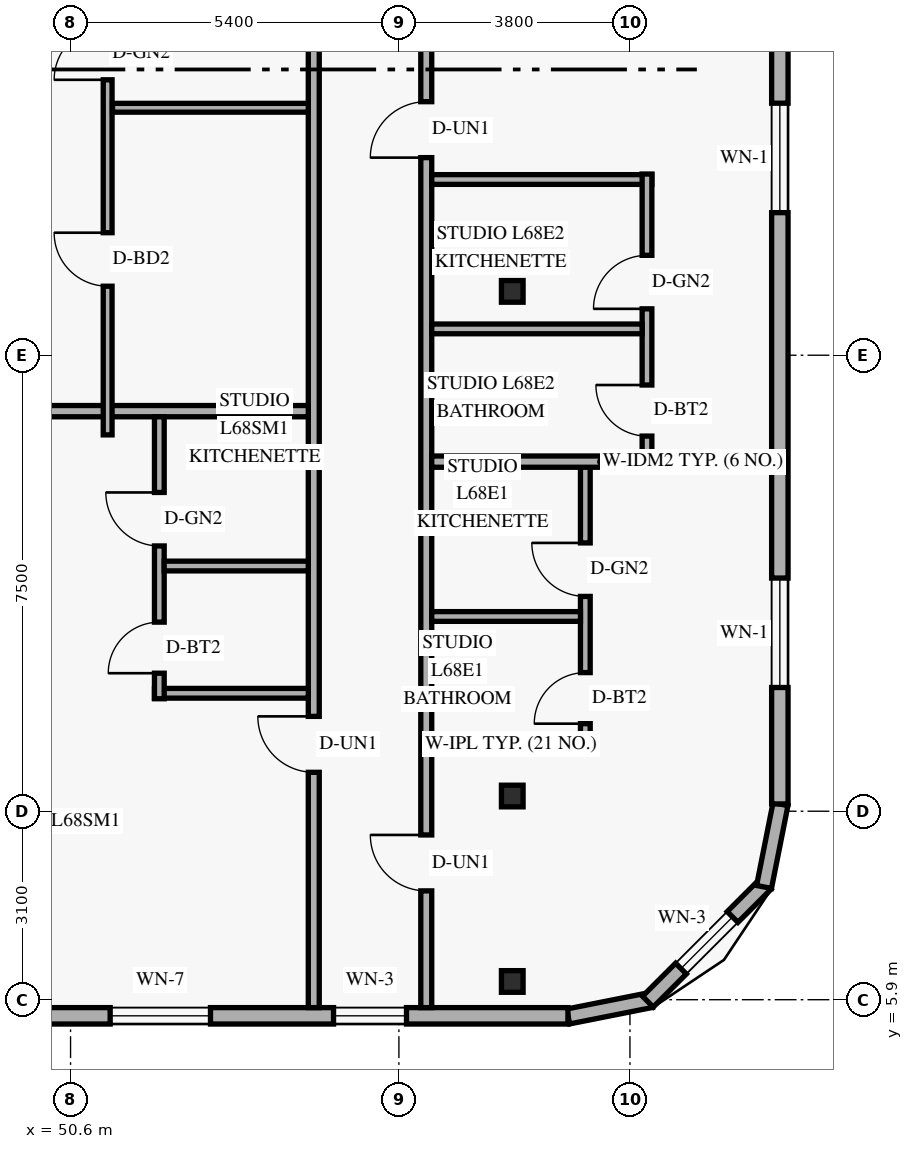
"""IFC4 building model, lengths in metres.
Left out: names, types, materials, properties, quantities, classifications, styles, units other than length and angle.
Written with IfcOpenShell. Run it as: python <this file> out.ifc"""

import sys

from ifc_helpers import new_model, si_unit, direction, frame, frame_2d, origin, origin_2d, place, context, subcontext, project, spatial, rectangle, hollow_rectangle, extrude, element, fill, save


model = new_model("IFC4")
c1 = context("Model", 3, precision=1e-05, world=origin(), true_north=direction((0.0, 1.0)))
c2 = subcontext(c1, "Body", "Model", "MODEL_VIEW")
j1 = project(units=[si_unit("LENGTHUNIT", "METRE"), si_unit("PLANEANGLEUNIT", "RADIAN")], contexts=[c1])
p1 = place(None, origin())
s1 = spatial("IfcSite", under=j1, at=p1, CompositionType="ELEMENT")
p2 = place(p1, origin())
s2 = spatial("IfcBuilding", under=s1, at=p2, CompositionType="ELEMENT")
p3 = place(p2, frame((0.0, 0.0, 260.4)))
s3 = spatial("IfcBuildingStorey", under=s2, at=p3, CompositionType="ELEMENT", Elevation=260.4)
for number, where, z_axis, x_axis in (
    (1, (57.76, 6.2, 0.0), (0.058, 0.0, 0.998), (0.0, 1.0, 0.0)),
    (2, (57.76, 9.25, 0.0), (0.058, 0.0, 0.998), (0.0, 1.0, 0.0)),
    (3, (57.76, 17.55, 0.0), (0.058, 0.0, 0.998), (0.0, 1.0, 0.0)),
):
    element("IfcColumn", number, at=place(p3, frame(where, z_axis=z_axis, x_axis=x_axis)), inside=s3, PredefinedType="COLUMN", context=c2, shape_type="SweptSolid", body=[
        extrude(hollow_rectangle(XDim=0.356, YDim=0.356, WallThickness=0.016, at=origin_2d()), origin(), (0.0, 0.0, 1.0), 3.606),
    ])
p4 = place(p3, frame((58.783, 5.624, 0.0), z_axis=(0.0, 0.0, 1.0), x_axis=(0.980809899341, 0.19496651342, 0.0)))
e4 = element("IfcWall", 4, at=p4, inside=s3, PredefinedType="SOLIDWALL", context=c2, shape_type="SweptSolid", body=[
    extrude(rectangle(XDim=1.389, YDim=0.25, at=frame_2d((0.694, 0.0))), origin(), (0.0, 0.0, 1.0), 3.36),
])
p5 = place(p3, frame((60.095, 5.868, 0.0), z_axis=(0.0, 0.0, 1.0), x_axis=(0.707106781187, 0.707106781187, 0.0)))
e5 = element("IfcWall", 5, at=p5, inside=s3, PredefinedType="SOLIDWALL", context=c2, shape_type="SweptSolid", body=[
    extrude(rectangle(XDim=2.739, YDim=0.25, at=frame_2d((1.37, 0.0))), origin(), (0.0, 0.0, 1.0), 3.36),
])
p6 = place(p5, frame((0.77, 0.0, 0.85)))
e6 = element("IfcOpeningElement", 6, at=p6, cuts=e5, PredefinedType="OPENING", context=c2, shape_type="SweptSolid", body=[
    extrude(rectangle(XDim=1.2, YDim=1.5, at=frame_2d((0.6, 0.75))), frame((0.0, 0.135, 0.0), z_axis=(0.0, -1.0, 0.0), x_axis=(1.0, 0.0, 0.0)), (0.0, 0.0, 1.0), 0.27),
])
p7 = place(p3, frame((62.005, 7.754, 0.0), z_axis=(0.0, 0.0, 1.0), x_axis=(0.195135625965, 0.9807762678, 0.0)))
e7 = element("IfcWall", 7, at=p7, inside=s3, PredefinedType="SOLIDWALL", context=c2, shape_type="SweptSolid", body=[
    extrude(rectangle(XDim=1.389, YDim=0.25, at=frame_2d((0.694, 0.0))), origin(), (0.0, 0.0, 1.0), 3.36),
])
p8 = place(p3, frame((25.82, 5.635, 0.0), z_axis=(0.0, 0.0, 1.0), x_axis=(1.0, 0.0, 0.0)))
e8 = element("IfcWall", 8, at=p8, inside=s3, PredefinedType="SOLIDWALL", context=c2, shape_type="SweptSolid", body=[
    extrude(rectangle(XDim=32.96, YDim=0.27, at=frame_2d((16.48, 0.0))), origin(), (0.0, 0.0, 1.0), 3.36),
])
p9 = place(p8, frame((14.212, 0.0, 0.85)))
e9 = element("IfcOpeningElement", 9, at=p9, cuts=e8, PredefinedType="OPENING", context=c2, shape_type="SweptSolid", body=[
    extrude(rectangle(XDim=1.65, YDim=1.6, at=frame_2d((0.825, 0.8))), frame((0.0, 0.145, 0.0), z_axis=(0.0, -1.0, 0.0), x_axis=(1.0, 0.0, 0.0)), (0.0, 0.0, 1.0), 0.29),
])
p10 = place(p8, frame((25.431, 0.0, 0.85)))
e10 = element("IfcOpeningElement", 10, at=p10, cuts=e8, PredefinedType="OPENING", context=c2, shape_type="SweptSolid", body=[
    extrude(rectangle(XDim=1.65, YDim=1.6, at=frame_2d((0.825, 0.8))), frame((0.0, 0.145, 0.0), z_axis=(0.0, -1.0, 0.0), x_axis=(1.0, 0.0, 0.0)), (0.0, 0.0, 1.0), 0.29),
])
p11 = place(p8, frame((29.105, 0.0, 0.85)))
e11 = element("IfcOpeningElement", 11, at=p11, cuts=e8, PredefinedType="OPENING", context=c2, shape_type="SweptSolid", body=[
    extrude(rectangle(XDim=1.2, YDim=1.5, at=frame_2d((0.6, 0.75))), frame((0.0, 0.145, 0.0), z_axis=(0.0, -1.0, 0.0), x_axis=(1.0, 0.0, 0.0)), (0.0, 0.0, 1.0), 0.29),
])
p12 = place(p3, frame((62.265, 9.12, 0.0), z_axis=(0.0, 0.0, 1.0), x_axis=(0.0, 1.0, 0.0)))
e12 = element("IfcWall", 12, at=p12, inside=s3, PredefinedType="SOLIDWALL", context=c2, shape_type="SweptSolid", body=[
    extrude(rectangle(XDim=29.76, YDim=0.27, at=frame_2d((14.88, 0.0))), origin(), (0.0, 0.0, 1.0), 3.36),
])
p13 = place(p12, frame((1.915, 0.0, 0.85)))
e13 = element("IfcOpeningElement", 13, at=p13, cuts=e12, PredefinedType="OPENING", context=c2, shape_type="SweptSolid", body=[
    extrude(rectangle(XDim=1.8, YDim=1.6, at=frame_2d((0.9, 0.8))), frame((0.0, 0.145, 0.0), z_axis=(0.0, -1.0, 0.0), x_axis=(1.0, 0.0, 0.0)), (0.0, 0.0, 1.0), 0.29),
])
p14 = place(p12, frame((9.725, 0.0, 0.85)))
e14 = element("IfcOpeningElement", 14, at=p14, cuts=e12, PredefinedType="OPENING", context=c2, shape_type="SweptSolid", body=[
    extrude(rectangle(XDim=1.8, YDim=1.6, at=frame_2d((0.9, 0.8))), frame((0.0, 0.145, 0.0), z_axis=(0.0, -1.0, 0.0), x_axis=(1.0, 0.0, 0.0)), (0.0, 0.0, 1.0), 0.29),
])
p15 = place(p12, frame((19.345, 0.0, 0.85)))
e15 = element("IfcOpeningElement", 15, at=p15, cuts=e12, PredefinedType="OPENING", context=c2, shape_type="SweptSolid", body=[
    extrude(rectangle(XDim=1.8, YDim=1.6, at=frame_2d((0.9, 0.8))), frame((0.0, 0.145, 0.0), z_axis=(0.0, -1.0, 0.0), x_axis=(1.0, 0.0, 0.0)), (0.0, 0.0, 1.0), 0.29),
])
p16 = place(p12, frame((26.415, 0.0, 0.85)))
e16 = element("IfcOpeningElement", 16, at=p16, cuts=e12, PredefinedType="OPENING", context=c2, shape_type="SweptSolid", body=[
    extrude(rectangle(XDim=1.8, YDim=1.6, at=frame_2d((0.9, 0.8))), frame((0.0, 0.145, 0.0), z_axis=(0.0, -1.0, 0.0), x_axis=(1.0, 0.0, 0.0)), (0.0, 0.0, 1.0), 0.29),
])
p17 = place(p3, frame((54.6, 5.77, 0.0), z_axis=(0.0, 0.0, 1.0), x_axis=(0.0, 1.0, 0.0)))
e17 = element("IfcWall", 17, at=p17, inside=s3, PredefinedType="STANDARD", context=c2, shape_type="SweptSolid", body=[
    extrude(rectangle(XDim=19.23, YDim=0.18, at=frame_2d((9.615, 0.0))), origin(), (0.0, 0.0, 1.0), 2.803),
])
p18 = place(p17, frame((3.87, 0.0, 0.0)))
e18 = element("IfcOpeningElement", 18, at=p18, cuts=e17, PredefinedType="OPENING", context=c2, shape_type="SweptSolid", body=[
    extrude(rectangle(XDim=0.92, YDim=2.15, at=frame_2d((0.46, 1.075))), frame((0.0, 0.1, 0.0), z_axis=(0.0, -1.0, 0.0), x_axis=(1.0, 0.0, 0.0)), (0.0, 0.0, 1.0), 0.2),
])
p19 = place(p3, frame((56.45, 5.77, 0.0), z_axis=(0.0, 0.0, 1.0), x_axis=(0.0, 1.0, 0.0)))
e19 = element("IfcWall", 19, at=p19, inside=s3, PredefinedType="STANDARD", context=c2, shape_type="SweptSolid", body=[
    extrude(rectangle(XDim=36.46, YDim=0.18, at=frame_2d((18.23, 0.0))), origin(), (0.0, 0.0, 1.0), 2.803),
])
p20 = place(p19, frame((1.92, 0.0, 0.0)))
e20 = element("IfcOpeningElement", 20, at=p20, cuts=e19, PredefinedType="OPENING", context=c2, shape_type="SweptSolid", body=[
    extrude(rectangle(XDim=0.92, YDim=2.15, at=frame_2d((0.46, 1.075))), frame((0.0, 0.1, 0.0), z_axis=(0.0, -1.0, 0.0), x_axis=(1.0, 0.0, 0.0)), (0.0, 0.0, 1.0), 0.2),
])
p21 = place(p19, frame((13.98, 0.0, 0.0)))
e21 = element("IfcOpeningElement", 21, at=p21, cuts=e19, PredefinedType="OPENING", context=c2, shape_type="SweptSolid", body=[
    extrude(rectangle(XDim=0.92, YDim=2.15, at=frame_2d((0.46, 1.075))), frame((0.0, 0.1, 0.0), z_axis=(0.0, -1.0, 0.0), x_axis=(1.0, 0.0, 0.0)), (0.0, 0.0, 1.0), 0.2),
])
p22 = place(p19, frame((24.99, 0.0, 0.0)))
e22 = element("IfcOpeningElement", 22, at=p22, cuts=e19, PredefinedType="OPENING", context=c2, shape_type="SweptSolid", body=[
    extrude(rectangle(XDim=0.92, YDim=2.15, at=frame_2d((0.46, 1.075))), frame((0.0, 0.1, 0.0), z_axis=(0.0, -1.0, 0.0), x_axis=(1.0, 0.0, 0.0)), (0.0, 0.0, 1.0), 0.2),
])
p23 = place(p19, frame((33.64, 0.0, 0.0)))
e23 = element("IfcOpeningElement", 23, at=p23, cuts=e19, PredefinedType="OPENING", context=c2, shape_type="SweptSolid", body=[
    extrude(rectangle(XDim=0.92, YDim=2.15, at=frame_2d((0.46, 1.075))), frame((0.0, 0.1, 0.0), z_axis=(0.0, -1.0, 0.0), x_axis=(1.0, 0.0, 0.0)), (0.0, 0.0, 1.0), 0.2),
])
p24 = place(p3, frame((56.54, 10.11, 0.0), z_axis=(0.0, 0.0, 1.0), x_axis=(1.0, 0.0, 0.0)))
e24 = element("IfcWall", 24, at=p24, inside=s3, PredefinedType="PLUMBINGWALL", context=c2, shape_type="SweptSolid", body=[
    extrude(rectangle(XDim=2.606, YDim=0.16, at=frame_2d((1.303, 0.0))), origin(), (0.0, 0.0, 1.0), 2.879),
])
p25 = place(p3, frame((59.066, 10.02, 0.0), z_axis=(0.0, 0.0, 1.0), x_axis=(0.0, 1.0, 0.0)))
e25 = element("IfcWall", 25, at=p25, inside=s3, PredefinedType="PLUMBINGWALL", context=c2, shape_type="SweptSolid", body=[
    extrude(rectangle(XDim=4.73, YDim=0.16, at=frame_2d((2.365, 0.0))), origin(), (0.0, 0.0, 1.0), 3.36),
])
p26 = place(p25, frame((0.42, 0.0, 0.0)))
e26 = element("IfcOpeningElement", 26, at=p26, cuts=e25, PredefinedType="OPENING", context=c2, shape_type="SweptSolid", body=[
    extrude(rectangle(XDim=0.84, YDim=2.12, at=frame_2d((0.42, 1.06))), frame((0.0, 0.09, 0.0), z_axis=(0.0, -1.0, 0.0), x_axis=(1.0, 0.0, 0.0)), (0.0, 0.0, 1.0), 0.18),
])
p27 = place(p25, frame((2.513, 0.0, 0.0)))
e27 = element("IfcOpeningElement", 27, at=p27, cuts=e25, PredefinedType="OPENING", context=c2, shape_type="SweptSolid", body=[
    extrude(rectangle(XDim=0.88, YDim=2.12, at=frame_2d((0.44, 1.06))), frame((0.0, 0.09, 0.0), z_axis=(0.0, -1.0, 0.0), x_axis=(1.0, 0.0, 0.0)), (0.0, 0.0, 1.0), 0.18),
])
p28 = place(p3, frame((56.54, 12.203, 0.0), z_axis=(0.0, 0.0, 1.0), x_axis=(1.0, 0.0, 0.0)))
e28 = element("IfcWall", 28, at=p28, inside=s3, PredefinedType="PLUMBINGWALL", context=c2, shape_type="SweptSolid", body=[
    extrude(rectangle(XDim=2.446, YDim=0.16, at=frame_2d((1.223, 0.0))), origin(), (0.0, 0.0, 1.0), 2.879),
])
p29 = place(p3, frame((56.54, 14.75, 0.0), z_axis=(0.0, 0.0, 1.0), x_axis=(1.0, 0.0, 0.0)))
e29 = element("IfcWall", 29, at=p29, inside=s3, PredefinedType="PARTITIONING", context=c2, shape_type="SweptSolid", body=[
    extrude(rectangle(XDim=5.59, YDim=0.185, at=frame_2d((2.795, 0.0))), origin(), (0.0, 0.0, 1.0), 2.879),
])
p30 = place(p3, frame((56.54, 19.39, 0.0), z_axis=(0.0, 0.0, 1.0), x_axis=(1.0, 0.0, 0.0)))
e30 = element("IfcWall", 30, at=p30, inside=s3, PredefinedType="PLUMBINGWALL", context=c2, shape_type="SweptSolid", body=[
    extrude(rectangle(XDim=3.62, YDim=0.16, at=frame_2d((1.81, 0.0))), origin(), (0.0, 0.0, 1.0), 2.879),
])
p31 = place(p3, frame((60.08, 14.843, 0.0), z_axis=(0.0, 0.0, 1.0), x_axis=(0.0, 1.0, 0.0)))
e31 = element("IfcWall", 31, at=p31, inside=s3, PredefinedType="PLUMBINGWALL", context=c2, shape_type="SweptSolid", body=[
    extrude(rectangle(XDim=4.637, YDim=0.16, at=frame_2d((2.319, 0.0))), origin(), (0.0, 0.0, 1.0), 3.36),
])
p32 = place(p31, frame((0.327, 0.0, 0.0)))
e32 = element("IfcOpeningElement", 32, at=p32, cuts=e31, PredefinedType="OPENING", context=c2, shape_type="SweptSolid", body=[
    extrude(rectangle(XDim=0.84, YDim=2.12, at=frame_2d((0.42, 1.06))), frame((0.0, 0.09, 0.0), z_axis=(0.0, -1.0, 0.0), x_axis=(1.0, 0.0, 0.0)), (0.0, 0.0, 1.0), 0.18),
])
p33 = place(p31, frame((2.42, 0.0, 0.0)))
e33 = element("IfcOpeningElement", 33, at=p33, cuts=e31, PredefinedType="OPENING", context=c2, shape_type="SweptSolid", body=[
    extrude(rectangle(XDim=0.88, YDim=2.12, at=frame_2d((0.44, 1.06))), frame((0.0, 0.09, 0.0), z_axis=(0.0, -1.0, 0.0), x_axis=(1.0, 0.0, 0.0)), (0.0, 0.0, 1.0), 0.18),
])
p34 = place(p3, frame((56.54, 16.933, 0.0), z_axis=(0.0, 0.0, 1.0), x_axis=(1.0, 0.0, 0.0)))
e34 = element("IfcWall", 34, at=p34, inside=s3, PredefinedType="PLUMBINGWALL", context=c2, shape_type="SweptSolid", body=[
    extrude(rectangle(XDim=3.46, YDim=0.16, at=frame_2d((1.73, 0.0))), origin(), (0.0, 0.0, 1.0), 2.879),
])
p35 = place(p3, frame((37.64, 15.58, 0.0), z_axis=(0.0, 0.0, 1.0), x_axis=(1.0, 0.0, 0.0)))
e35 = element("IfcWall", 35, at=p35, inside=s3, PredefinedType="PARTITIONING", context=c2, shape_type="SweptSolid", body=[
    extrude(rectangle(XDim=16.87, YDim=0.185, at=frame_2d((8.435, 0.0))), origin(), (0.0, 0.0, 1.0), 2.803),
])
p36 = place(p3, frame((51.98, 10.94, 0.0), z_axis=(0.0, 0.0, 1.0), x_axis=(1.0, 0.0, 0.0)))
e36 = element("IfcWall", 36, at=p36, inside=s3, PredefinedType="PLUMBINGWALL", context=c2, shape_type="SweptSolid", body=[
    extrude(rectangle(XDim=2.53, YDim=0.16, at=frame_2d((1.265, 0.0))), origin(), (0.0, 0.0, 1.0), 3.36),
])
p37 = place(p3, frame((52.06, 10.85, 0.0), z_axis=(0.0, 0.0, 1.0), x_axis=(0.0, 1.0, 0.0)))
e37 = element("IfcWall", 37, at=p37, inside=s3, PredefinedType="PLUMBINGWALL", context=c2, shape_type="SweptSolid", body=[
    extrude(rectangle(XDim=4.637, YDim=0.16, at=frame_2d((2.319, 0.0))), origin(), (0.0, 0.0, 1.0), 3.039),
])
p38 = place(p37, frame((0.42, 0.0, 0.0)))
e38 = element("IfcOpeningElement", 38, at=p38, cuts=e37, PredefinedType="OPENING", context=c2, shape_type="SweptSolid", body=[
    extrude(rectangle(XDim=0.84, YDim=2.12, at=frame_2d((0.42, 1.06))), frame((0.0, 0.09, 0.0), z_axis=(0.0, -1.0, 0.0), x_axis=(1.0, 0.0, 0.0)), (0.0, 0.0, 1.0), 0.18),
])
p39 = place(p37, frame((2.513, 0.0, 0.0)))
e39 = element("IfcOpeningElement", 39, at=p39, cuts=e37, PredefinedType="OPENING", context=c2, shape_type="SweptSolid", body=[
    extrude(rectangle(XDim=0.88, YDim=2.12, at=frame_2d((0.44, 1.06))), frame((0.0, 0.09, 0.0), z_axis=(0.0, -1.0, 0.0), x_axis=(1.0, 0.0, 0.0)), (0.0, 0.0, 1.0), 0.18),
])
p40 = place(p3, frame((52.14, 13.033, 0.0), z_axis=(0.0, 0.0, 1.0), x_axis=(1.0, 0.0, 0.0)))
e40 = element("IfcWall", 40, at=p40, inside=s3, PredefinedType="PLUMBINGWALL", context=c2, shape_type="SweptSolid", body=[
    extrude(rectangle(XDim=2.37, YDim=0.16, at=frame_2d((1.185, 0.0))), origin(), (0.0, 0.0, 1.0), 3.36),
])
p41 = place(p3, frame((51.21, 15.19, 0.0), z_axis=(0.0, 0.0, 1.0), x_axis=(0.0, 1.0, 0.0)))
e41 = element("IfcWall", 41, at=p41, inside=s3, PredefinedType="PARTITIONING", context=c2, shape_type="SweptSolid", body=[
    extrude(rectangle(XDim=9.72, YDim=0.145, at=frame_2d((4.86, 0.0))), origin(), (0.0, 0.0, 1.0), 2.803),
])
p42 = place(p41, frame((2.445, 0.0, 0.0)))
e42 = element("IfcOpeningElement", 42, at=p42, cuts=e41, PredefinedType="OPENING", context=c2, shape_type="SweptSolid", body=[
    extrude(rectangle(XDim=0.88, YDim=2.14, at=frame_2d((0.44, 1.07))), frame((0.0, 0.083, 0.0), z_axis=(0.0, -1.0, 0.0), x_axis=(1.0, 0.0, 0.0)), (0.0, 0.0, 1.0), 0.165),
])
p43 = place(p41, frame((5.84, 0.0, 0.0)))
e43 = element("IfcOpeningElement", 43, at=p43, cuts=e41, PredefinedType="OPENING", context=c2, shape_type="SweptSolid", body=[
    extrude(rectangle(XDim=0.88, YDim=2.12, at=frame_2d((0.44, 1.06))), frame((0.0, 0.083, 0.0), z_axis=(0.0, -1.0, 0.0), x_axis=(1.0, 0.0, 0.0)), (0.0, 0.0, 1.0), 0.165),
])
p44 = place(p3, frame((51.29, 20.57, 0.0), z_axis=(0.0, 0.0, 1.0), x_axis=(1.0, 0.0, 0.0)))
e44 = element("IfcWall", 44, at=p44, inside=s3, PredefinedType="PARTITIONING", context=c2, shape_type="SweptSolid", body=[
    extrude(rectangle(XDim=3.22, YDim=0.145, at=frame_2d((1.61, 0.0))), origin(), (0.0, 0.0, 1.0), 3.36),
])
p45 = place(p6, origin())
e45 = element("IfcWindow", 45, at=p45, inside=s3, PartitioningType="SINGLE_PANEL", PredefinedType="WINDOW", context=c2, shape_type="SweptSolid", body=[
    extrude(rectangle(XDim=1.2, YDim=1.5, at=frame_2d((0.6, 0.75))), frame((0.0, 0.03, 0.0), z_axis=(0.0, -1.0, 0.0), x_axis=(1.0, 0.0, 0.0)), (0.0, 0.0, 1.0), 0.06),
])
fill(e6, e45)
p46 = place(p10, origin())
e46 = element("IfcWindow", 46, at=p46, inside=s3, PartitioningType="SINGLE_PANEL", PredefinedType="WINDOW", context=c2, shape_type="SweptSolid", body=[
    extrude(rectangle(XDim=1.65, YDim=1.6, at=frame_2d((0.825, 0.8))), frame((0.0, 0.03, 0.0), z_axis=(0.0, -1.0, 0.0), x_axis=(1.0, 0.0, 0.0)), (0.0, 0.0, 1.0), 0.06),
])
fill(e10, e46)
p47 = place(p11, origin())
e47 = element("IfcWindow", 47, at=p47, inside=s3, PartitioningType="SINGLE_PANEL", PredefinedType="WINDOW", context=c2, shape_type="SweptSolid", body=[
    extrude(rectangle(XDim=1.2, YDim=1.5, at=frame_2d((0.6, 0.75))), frame((0.0, 0.03, 0.0), z_axis=(0.0, -1.0, 0.0), x_axis=(1.0, 0.0, 0.0)), (0.0, 0.0, 1.0), 0.06),
])
fill(e11, e47)
p48 = place(p13, origin())
e48 = element("IfcWindow", 48, at=p48, inside=s3, PartitioningType="SINGLE_PANEL", PredefinedType="WINDOW", context=c2, shape_type="SweptSolid", body=[
    extrude(rectangle(XDim=1.8, YDim=1.6, at=frame_2d((0.9, 0.8))), frame((0.0, 0.03, 0.0), z_axis=(0.0, -1.0, 0.0), x_axis=(1.0, 0.0, 0.0)), (0.0, 0.0, 1.0), 0.06),
])
fill(e13, e48)
p49 = place(p14, origin())
e49 = element("IfcWindow", 49, at=p49, inside=s3, PartitioningType="SINGLE_PANEL", PredefinedType="WINDOW", context=c2, shape_type="SweptSolid", body=[
    extrude(rectangle(XDim=1.8, YDim=1.6, at=frame_2d((0.9, 0.8))), frame((0.0, 0.03, 0.0), z_axis=(0.0, -1.0, 0.0), x_axis=(1.0, 0.0, 0.0)), (0.0, 0.0, 1.0), 0.06),
])
fill(e14, e49)
p50 = place(p20, origin())
e50 = element("IfcDoor", 50, at=p50, inside=s3, OperationType="SINGLE_SWING_RIGHT", PredefinedType="DOOR", context=c2, shape_type="SweptSolid", body=[
    extrude(rectangle(XDim=0.92, YDim=2.15, at=frame_2d((0.46, 1.075))), frame((0.0, 0.025, 0.0), z_axis=(0.0, -1.0, 0.0), x_axis=(1.0, 0.0, 0.0)), (0.0, 0.0, 1.0), 0.05),
])
fill(e20, e50)
p51 = place(p26, origin())
e51 = element("IfcDoor", 51, at=p51, inside=s3, OperationType="SINGLE_SWING_LEFT", PredefinedType="DOOR", context=c2, shape_type="SweptSolid", body=[
    extrude(rectangle(XDim=0.84, YDim=2.12, at=frame_2d((0.42, 1.06))), frame((0.0, 0.025, 0.0), z_axis=(0.0, -1.0, 0.0), x_axis=(1.0, 0.0, 0.0)), (0.0, 0.0, 1.0), 0.05),
])
fill(e26, e51)
p52 = place(p27, origin())
e52 = element("IfcDoor", 52, at=p52, inside=s3, OperationType="SINGLE_SWING_RIGHT", PredefinedType="DOOR", context=c2, shape_type="SweptSolid", body=[
    extrude(rectangle(XDim=0.88, YDim=2.12, at=frame_2d((0.44, 1.06))), frame((0.0, 0.025, 0.0), z_axis=(0.0, -1.0, 0.0), x_axis=(1.0, 0.0, 0.0)), (0.0, 0.0, 1.0), 0.05),
])
fill(e27, e52)
p53 = place(p21, origin())
e53 = element("IfcDoor", 53, at=p53, inside=s3, OperationType="SINGLE_SWING_LEFT", PredefinedType="DOOR", context=c2, shape_type="SweptSolid", body=[
    extrude(rectangle(XDim=0.92, YDim=2.15, at=frame_2d((0.46, 1.075))), frame((0.0, 0.025, 0.0), z_axis=(0.0, -1.0, 0.0), x_axis=(1.0, 0.0, 0.0)), (0.0, 0.0, 1.0), 0.05),
])
fill(e21, e53)
p54 = place(p32, origin())
e54 = element("IfcDoor", 54, at=p54, inside=s3, OperationType="SINGLE_SWING_RIGHT", PredefinedType="DOOR", context=c2, shape_type="SweptSolid", body=[
    extrude(rectangle(XDim=0.84, YDim=2.12, at=frame_2d((0.42, 1.06))), frame((0.0, 0.025, 0.0), z_axis=(0.0, -1.0, 0.0), x_axis=(1.0, 0.0, 0.0)), (0.0, 0.0, 1.0), 0.05),
])
fill(e32, e54)
p55 = place(p33, origin())
e55 = element("IfcDoor", 55, at=p55, inside=s3, OperationType="SINGLE_SWING_LEFT", PredefinedType="DOOR", context=c2, shape_type="SweptSolid", body=[
    extrude(rectangle(XDim=0.88, YDim=2.12, at=frame_2d((0.44, 1.06))), frame((0.0, 0.025, 0.0), z_axis=(0.0, -1.0, 0.0), x_axis=(1.0, 0.0, 0.0)), (0.0, 0.0, 1.0), 0.05),
])
fill(e33, e55)
p56 = place(p18, origin())
e56 = element("IfcDoor", 56, at=p56, inside=s3, OperationType="SINGLE_SWING_RIGHT", PredefinedType="DOOR", context=c2, shape_type="SweptSolid", body=[
    extrude(rectangle(XDim=0.92, YDim=2.15, at=frame_2d((0.46, 1.075))), frame((0.0, 0.025, 0.0), z_axis=(0.0, -1.0, 0.0), x_axis=(1.0, 0.0, 0.0)), (0.0, 0.0, 1.0), 0.05),
])
fill(e18, e56)
p57 = place(p38, origin())
e57 = element("IfcDoor", 57, at=p57, inside=s3, OperationType="SINGLE_SWING_LEFT", PredefinedType="DOOR", context=c2, shape_type="SweptSolid", body=[
    extrude(rectangle(XDim=0.84, YDim=2.12, at=frame_2d((0.42, 1.06))), frame((0.0, 0.025, 0.0), z_axis=(0.0, -1.0, 0.0), x_axis=(1.0, 0.0, 0.0)), (0.0, 0.0, 1.0), 0.05),
])
fill(e38, e57)
p58 = place(p39, origin())
e58 = element("IfcDoor", 58, at=p58, inside=s3, OperationType="SINGLE_SWING_RIGHT", PredefinedType="DOOR", context=c2, shape_type="SweptSolid", body=[
    extrude(rectangle(XDim=0.88, YDim=2.12, at=frame_2d((0.44, 1.06))), frame((0.0, 0.025, 0.0), z_axis=(0.0, -1.0, 0.0), x_axis=(1.0, 0.0, 0.0)), (0.0, 0.0, 1.0), 0.05),
])
fill(e39, e58)
p59 = place(p42, origin())
e59 = element("IfcDoor", 59, at=p59, inside=s3, OperationType="SINGLE_SWING_RIGHT", PredefinedType="DOOR", context=c2, shape_type="SweptSolid", body=[
    extrude(rectangle(XDim=0.88, YDim=2.14, at=frame_2d((0.44, 1.07))), frame((0.0, 0.025, 0.0), z_axis=(0.0, -1.0, 0.0), x_axis=(1.0, 0.0, 0.0)), (0.0, 0.0, 1.0), 0.05),
])
fill(e42, e59)
p60 = place(p43, origin())
e60 = element("IfcDoor", 60, at=p60, inside=s3, OperationType="SINGLE_SWING_LEFT", PredefinedType="DOOR", context=c2, shape_type="SweptSolid", body=[
    extrude(rectangle(XDim=0.88, YDim=2.12, at=frame_2d((0.44, 1.06))), frame((0.0, 0.025, 0.0), z_axis=(0.0, -1.0, 0.0), x_axis=(1.0, 0.0, 0.0)), (0.0, 0.0, 1.0), 0.05),
])
fill(e43, e60)
save(model, sys.argv[1])
